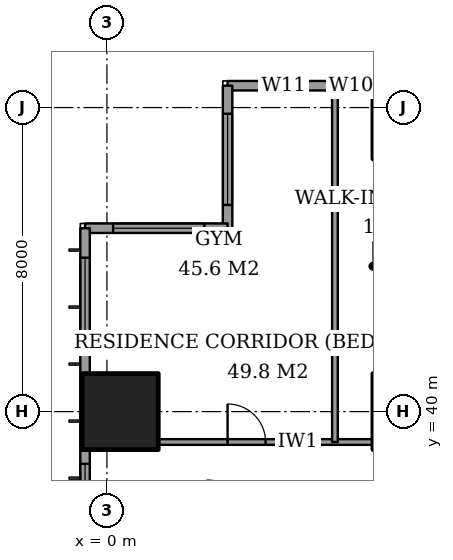
"""IFC4 building model, lengths in metres.
Left out: names, types, materials, properties, quantities, classifications, styles, units other than length and angle.
Written with IfcOpenShell. Run it as: python <this file> out.ifc"""

import sys

from ifc_helpers import new_model, si_unit, direction, frame, frame_2d, origin, origin_2d, place, context, subcontext, project, spatial, rectangle, extrude, element, fill, save


model = new_model("IFC4")
c1 = context("Model", 3, precision=1e-05, world=origin(), true_north=direction((0.0, 1.0)))
c2 = subcontext(c1, "Body", "Model", "MODEL_VIEW")
j1 = project(units=[si_unit("LENGTHUNIT", "METRE"), si_unit("PLANEANGLEUNIT", "RADIAN")], contexts=[c1])
p1 = place(None, origin())
s1 = spatial("IfcSite", under=j1, at=p1, CompositionType="ELEMENT")
p2 = place(p1, origin())
s2 = spatial("IfcBuilding", under=s1, at=p2, CompositionType="ELEMENT")
p3 = place(p2, frame((0.0, 0.0, 110.6)))
s3 = spatial("IfcBuildingStorey", under=s2, at=p3, CompositionType="ELEMENT", Elevation=110.6)
p4 = place(p3, frame((0.35, 40.0, 0.0), z_axis=(0.0, 0.0, 1.0), x_axis=(1.0, 0.0, 0.0)))
e1 = element("IfcColumn", 1, at=p4, inside=s3, PredefinedType="COLUMN", context=c2, shape_type="SweptSolid", body=[
    extrude(rectangle(XDim=2.0, YDim=2.0, at=origin_2d()), origin(), (0.0, 0.0, 1.0), 3.6),
])
p5 = place(p3, frame((24.575, 48.575, 0.0), z_axis=(0.0, 0.0, 1.0), x_axis=(-1.0, 0.0, 0.0)))
e2 = element("IfcWall", 2, at=p5, inside=s3, PredefinedType="SOLIDWALL", context=c2, shape_type="SweptSolid", body=[
    extrude(rectangle(XDim=21.4, YDim=0.25, at=frame_2d((10.7, 0.0))), origin(), (0.0, 0.0, 1.0), 3.6),
])
p6 = place(p5, frame((2.275, 0.0, 0.4)))
e3 = element("IfcOpeningElement", 3, at=p6, cuts=e2, PredefinedType="OPENING", context=c2, shape_type="SweptSolid", body=[
    extrude(rectangle(XDim=1.2, YDim=2.2, at=frame_2d((0.6, 1.1))), frame((0.0, 0.135, 0.0), z_axis=(0.0, -1.0, 0.0), x_axis=(1.0, 0.0, 0.0)), (0.0, 0.0, 1.0), 0.27),
])
p7 = place(p5, frame((4.425, 0.0, 0.4)))
e4 = element("IfcOpeningElement", 4, at=p7, cuts=e2, PredefinedType="OPENING", context=c2, shape_type="SweptSolid", body=[
    extrude(rectangle(XDim=2.4, YDim=2.2, at=frame_2d((1.2, 1.1))), frame((0.0, 0.135, 0.0), z_axis=(0.0, -1.0, 0.0), x_axis=(1.0, 0.0, 0.0)), (0.0, 0.0, 1.0), 0.27),
])
p8 = place(p5, frame((10.4, 0.0, 0.4)))
e5 = element("IfcOpeningElement", 5, at=p8, cuts=e2, PredefinedType="OPENING", context=c2, shape_type="SweptSolid", body=[
    extrude(rectangle(XDim=1.2, YDim=2.2, at=frame_2d((0.6, 1.1))), frame((0.0, 0.135, 0.0), z_axis=(0.0, -1.0, 0.0), x_axis=(1.0, 0.0, 0.0)), (0.0, 0.0, 1.0), 0.27),
])
p9 = place(p5, frame((12.475, 0.0, 0.4)))
e6 = element("IfcOpeningElement", 6, at=p9, cuts=e2, PredefinedType="OPENING", context=c2, shape_type="SweptSolid", body=[
    extrude(rectangle(XDim=2.4, YDim=2.2, at=frame_2d((1.2, 1.1))), frame((0.0, 0.135, 0.0), z_axis=(0.0, -1.0, 0.0), x_axis=(1.0, 0.0, 0.0)), (0.0, 0.0, 1.0), 0.27),
])
p10 = place(p5, frame((17.85, 0.0, 0.4)))
e7 = element("IfcOpeningElement", 7, at=p10, cuts=e2, PredefinedType="OPENING", context=c2, shape_type="SweptSolid", body=[
    extrude(rectangle(XDim=0.6, YDim=2.2, at=frame_2d((0.3, 1.1))), frame((0.0, 0.135, 0.0), z_axis=(0.0, -1.0, 0.0), x_axis=(1.0, 0.0, 0.0)), (0.0, 0.0, 1.0), 0.27),
])
p11 = place(p5, frame((19.325, 0.0, 0.4)))
e8 = element("IfcOpeningElement", 8, at=p11, cuts=e2, PredefinedType="OPENING", context=c2, shape_type="SweptSolid", body=[
    extrude(rectangle(XDim=1.2, YDim=2.2, at=frame_2d((0.6, 1.1))), frame((0.0, 0.135, 0.0), z_axis=(0.0, -1.0, 0.0), x_axis=(1.0, 0.0, 0.0)), (0.0, 0.0, 1.0), 0.27),
])
p12 = place(p3, frame((3.175, 48.575, 0.0), z_axis=(0.0, 0.0, 1.0), x_axis=(0.0, -1.0, 0.0)))
e9 = element("IfcWall", 9, at=p12, inside=s3, PredefinedType="SOLIDWALL", context=c2, shape_type="SweptSolid", body=[
    extrude(rectangle(XDim=3.75, YDim=0.25, at=frame_2d((1.875, 0.0))), origin(), (0.0, 0.0, 1.0), 3.6),
])
p13 = place(p12, frame((0.738, 0.0, 0.4)))
e10 = element("IfcOpeningElement", 10, at=p13, cuts=e9, PredefinedType="OPENING", context=c2, shape_type="SweptSolid", body=[
    extrude(rectangle(XDim=2.4, YDim=2.2, at=frame_2d((1.2, 1.1))), frame((0.0, 0.135, 0.0), z_axis=(0.0, -1.0, 0.0), x_axis=(1.0, 0.0, 0.0)), (0.0, 0.0, 1.0), 0.27),
])
p14 = place(p3, frame((3.175, 44.825, 0.0), z_axis=(0.0, 0.0, 1.0), x_axis=(-1.0, 0.0, 0.0)))
e11 = element("IfcWall", 11, at=p14, inside=s3, PredefinedType="SOLIDWALL", context=c2, shape_type="SweptSolid", body=[
    extrude(rectangle(XDim=3.75, YDim=0.25, at=frame_2d((1.875, 0.0))), origin(), (0.0, 0.0, 1.0), 3.6),
])
p15 = place(p14, frame((0.613, 0.0, 0.4)))
e12 = element("IfcOpeningElement", 12, at=p15, cuts=e11, PredefinedType="OPENING", context=c2, shape_type="SweptSolid", body=[
    extrude(rectangle(XDim=2.4, YDim=2.2, at=frame_2d((1.2, 1.1))), frame((0.0, 0.135, 0.0), z_axis=(0.0, -1.0, 0.0), x_axis=(1.0, 0.0, 0.0)), (0.0, 0.0, 1.0), 0.27),
])
p16 = place(p3, frame((-0.575, 44.825, 0.0), z_axis=(0.0, 0.0, 1.0), x_axis=(0.0, -1.0, 0.0)))
e13 = element("IfcWall", 13, at=p16, inside=s3, PredefinedType="SOLIDWALL", context=c2, shape_type="SweptSolid", body=[
    extrude(rectangle(XDim=41.65, YDim=0.25, at=frame_2d((20.825, 0.0))), origin(), (0.0, 0.0, 1.0), 3.6),
])
p17 = place(p16, frame((0.775, 0.0, 0.4)))
e14 = element("IfcOpeningElement", 14, at=p17, cuts=e13, PredefinedType="OPENING", context=c2, shape_type="SweptSolid", body=[
    extrude(rectangle(XDim=2.4, YDim=2.2, at=frame_2d((1.2, 1.1))), frame((0.0, 0.135, 0.0), z_axis=(0.0, -1.0, 0.0), x_axis=(1.0, 0.0, 0.0)), (0.0, 0.0, 1.0), 0.27),
])
p18 = place(p16, frame((6.2, 0.0, 0.4)))
e15 = element("IfcOpeningElement", 15, at=p18, cuts=e13, PredefinedType="OPENING", context=c2, shape_type="SweptSolid", body=[
    extrude(rectangle(XDim=1.2, YDim=2.2, at=frame_2d((0.6, 1.1))), frame((0.0, 0.135, 0.0), z_axis=(0.0, -1.0, 0.0), x_axis=(1.0, 0.0, 0.0)), (0.0, 0.0, 1.0), 0.27),
])
p19 = place(p16, frame((8.525, 0.0, 0.4)))
e16 = element("IfcOpeningElement", 16, at=p19, cuts=e13, PredefinedType="OPENING", context=c2, shape_type="SweptSolid", body=[
    extrude(rectangle(XDim=2.4, YDim=2.2, at=frame_2d((1.2, 1.1))), frame((0.0, 0.135, 0.0), z_axis=(0.0, -1.0, 0.0), x_axis=(1.0, 0.0, 0.0)), (0.0, 0.0, 1.0), 0.27),
])
p20 = place(p16, frame((15.625, 0.0, 0.4)))
e17 = element("IfcOpeningElement", 17, at=p20, cuts=e13, PredefinedType="OPENING", context=c2, shape_type="SweptSolid", body=[
    extrude(rectangle(XDim=2.4, YDim=2.2, at=frame_2d((1.2, 1.1))), frame((0.0, 0.135, 0.0), z_axis=(0.0, -1.0, 0.0), x_axis=(1.0, 0.0, 0.0)), (0.0, 0.0, 1.0), 0.27),
])
p21 = place(p16, frame((23.625, 0.0, 0.4)))
e18 = element("IfcOpeningElement", 18, at=p21, cuts=e13, PredefinedType="OPENING", context=c2, shape_type="SweptSolid", body=[
    extrude(rectangle(XDim=2.4, YDim=2.2, at=frame_2d((1.2, 1.1))), frame((0.0, 0.135, 0.0), z_axis=(0.0, -1.0, 0.0), x_axis=(1.0, 0.0, 0.0)), (0.0, 0.0, 1.0), 0.27),
])
p22 = place(p16, frame((30.825, 0.0, 0.4)))
e19 = element("IfcOpeningElement", 19, at=p22, cuts=e13, PredefinedType="OPENING", context=c2, shape_type="SweptSolid", body=[
    extrude(rectangle(XDim=2.4, YDim=2.2, at=frame_2d((1.2, 1.1))), frame((0.0, 0.135, 0.0), z_axis=(0.0, -1.0, 0.0), x_axis=(1.0, 0.0, 0.0)), (0.0, 0.0, 1.0), 0.27),
])
p23 = place(p16, frame((34.5, 0.0, 0.4)))
e20 = element("IfcOpeningElement", 20, at=p23, cuts=e13, PredefinedType="OPENING", context=c2, shape_type="SweptSolid", body=[
    extrude(rectangle(XDim=1.2, YDim=2.2, at=frame_2d((0.6, 1.1))), frame((0.0, 0.135, 0.0), z_axis=(0.0, -1.0, 0.0), x_axis=(1.0, 0.0, 0.0)), (0.0, 0.0, 1.0), 0.27),
])
p24 = place(p16, frame((38.475, 0.0, 0.4)))
e21 = element("IfcOpeningElement", 21, at=p24, cuts=e13, PredefinedType="OPENING", context=c2, shape_type="SweptSolid", body=[
    extrude(rectangle(XDim=2.4, YDim=2.2, at=frame_2d((1.2, 1.1))), frame((0.0, 0.135, 0.0), z_axis=(0.0, -1.0, 0.0), x_axis=(1.0, 0.0, 0.0)), (0.0, 0.0, 1.0), 0.27),
])
p25 = place(p3, frame((1.35, 39.2, 0.0), z_axis=(0.0, 0.0, 1.0), x_axis=(1.0, 0.0, 0.0)))
e22 = element("IfcWall", 22, at=p25, inside=s3, PredefinedType="PARTITIONING", context=c2, shape_type="SweptSolid", body=[
    extrude(rectangle(XDim=5.65, YDim=0.15, at=frame_2d((2.825, 0.0))), origin(), (0.0, 0.0, 1.0), 3.35),
])
p26 = place(p25, frame((1.825, 0.0, 0.0)))
e23 = element("IfcOpeningElement", 23, at=p26, cuts=e22, PredefinedType="OPENING", context=c2, shape_type="SweptSolid", body=[
    extrude(rectangle(XDim=1.0, YDim=2.1, at=frame_2d((0.5, 1.05))), frame((0.0, 0.085, 0.0), z_axis=(0.0, -1.0, 0.0), x_axis=(1.0, 0.0, 0.0)), (0.0, 0.0, 1.0), 0.17),
])
p27 = place(p3, frame((6.0, 39.2, 0.0), z_axis=(0.0, 0.0, 1.0), x_axis=(0.0, 1.0, 0.0)))
e24 = element("IfcWall", 24, at=p27, inside=s3, PredefinedType="PARTITIONING", context=c2, shape_type="SweptSolid", body=[
    extrude(rectangle(XDim=9.25, YDim=0.15, at=frame_2d((4.625, 0.0))), origin(), (0.0, 0.0, 1.0), 3.35),
])
p28 = place(p10, origin())
e25 = element("IfcWindow", 25, at=p28, inside=s3, PartitioningType="SINGLE_PANEL", PredefinedType="WINDOW", context=c2, shape_type="SweptSolid", body=[
    extrude(rectangle(XDim=0.6, YDim=2.2, at=frame_2d((0.3, 1.1))), frame((0.0, 0.03, 0.0), z_axis=(0.0, -1.0, 0.0), x_axis=(1.0, 0.0, 0.0)), (0.0, 0.0, 1.0), 0.06),
])
fill(e7, e25)
p29 = place(p11, origin())
e26 = element("IfcWindow", 26, at=p29, inside=s3, PartitioningType="SINGLE_PANEL", PredefinedType="WINDOW", context=c2, shape_type="SweptSolid", body=[
    extrude(rectangle(XDim=1.2, YDim=2.2, at=frame_2d((0.6, 1.1))), frame((0.0, 0.03, 0.0), z_axis=(0.0, -1.0, 0.0), x_axis=(1.0, 0.0, 0.0)), (0.0, 0.0, 1.0), 0.06),
])
fill(e8, e26)
p30 = place(p13, origin())
e27 = element("IfcWindow", 27, at=p30, inside=s3, PartitioningType="SINGLE_PANEL", PredefinedType="WINDOW", context=c2, shape_type="SweptSolid", body=[
    extrude(rectangle(XDim=2.4, YDim=2.2, at=frame_2d((1.2, 1.1))), frame((0.0, 0.03, 0.0), z_axis=(0.0, -1.0, 0.0), x_axis=(1.0, 0.0, 0.0)), (0.0, 0.0, 1.0), 0.06),
])
fill(e10, e27)
p31 = place(p15, origin())
e28 = element("IfcWindow", 28, at=p31, inside=s3, PartitioningType="SINGLE_PANEL", PredefinedType="WINDOW", context=c2, shape_type="SweptSolid", body=[
    extrude(rectangle(XDim=2.4, YDim=2.2, at=frame_2d((1.2, 1.1))), frame((0.0, 0.03, 0.0), z_axis=(0.0, -1.0, 0.0), x_axis=(1.0, 0.0, 0.0)), (0.0, 0.0, 1.0), 0.06),
])
fill(e12, e28)
p32 = place(p17, origin())
e29 = element("IfcWindow", 29, at=p32, inside=s3, PartitioningType="SINGLE_PANEL", PredefinedType="WINDOW", context=c2, shape_type="SweptSolid", body=[
    extrude(rectangle(XDim=2.4, YDim=2.2, at=frame_2d((1.2, 1.1))), frame((0.0, 0.03, 0.0), z_axis=(0.0, -1.0, 0.0), x_axis=(1.0, 0.0, 0.0)), (0.0, 0.0, 1.0), 0.06),
])
fill(e14, e29)
p33 = place(p18, origin())
e30 = element("IfcWindow", 30, at=p33, inside=s3, PartitioningType="SINGLE_PANEL", PredefinedType="WINDOW", context=c2, shape_type="SweptSolid", body=[
    extrude(rectangle(XDim=1.2, YDim=2.2, at=frame_2d((0.6, 1.1))), frame((0.0, 0.03, 0.0), z_axis=(0.0, -1.0, 0.0), x_axis=(1.0, 0.0, 0.0)), (0.0, 0.0, 1.0), 0.06),
])
fill(e15, e30)
p34 = place(p26, origin())
e31 = element("IfcDoor", 31, at=p34, inside=s3, OperationType="SINGLE_SWING_RIGHT", PredefinedType="DOOR", context=c2, shape_type="SweptSolid", body=[
    extrude(rectangle(XDim=1.0, YDim=2.1, at=frame_2d((0.5, 1.05))), frame((0.0, 0.025, 0.0), z_axis=(0.0, -1.0, 0.0), x_axis=(1.0, 0.0, 0.0)), (0.0, 0.0, 1.0), 0.05),
])
fill(e23, e31)
save(model, sys.argv[1])
